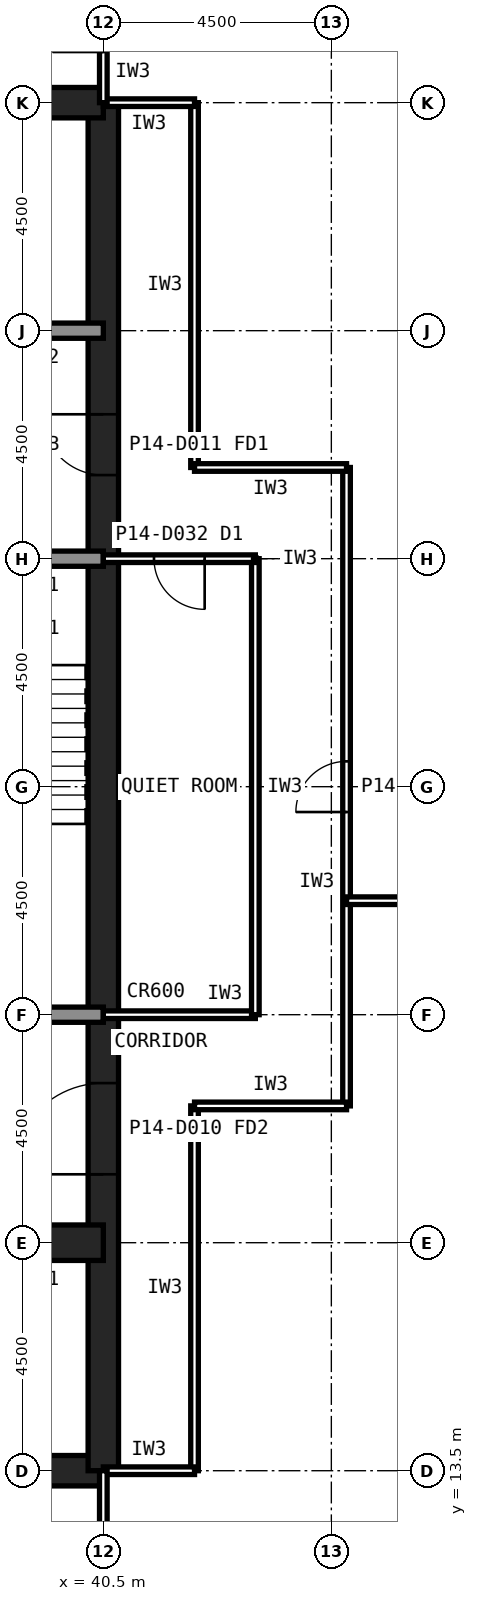
"""IFC4 building model, lengths in metres.
Left out: names, types, materials, properties, quantities, classifications, styles, units other than length and angle.
Written with IfcOpenShell. Run it as: python <this file> out.ifc"""

import sys

from ifc_helpers import new_model, si_unit, direction, frame, frame_2d, origin, place, context, subcontext, project, spatial, rectangle, extrude, element, fill, save


model = new_model("IFC4")
c1 = context("Model", 3, precision=1e-05, world=origin(), true_north=direction((0.0, 1.0)))
c2 = subcontext(c1, "Body", "Model", "MODEL_VIEW")
j1 = project(units=[si_unit("LENGTHUNIT", "METRE"), si_unit("PLANEANGLEUNIT", "RADIAN")], contexts=[c1])
p1 = place(None, origin())
s1 = spatial("IfcSite", under=j1, at=p1, CompositionType="ELEMENT")
p2 = place(p1, origin())
s2 = spatial("IfcBuilding", under=s1, at=p2, CompositionType="ELEMENT")
p3 = place(p2, frame((0.0, 0.0, 62.6)))
s3 = spatial("IfcBuildingStorey", under=s2, at=p3, CompositionType="ELEMENT", Elevation=62.6)
p4 = place(p3, frame((13.5, 13.5, 0.0), z_axis=(0.0, 0.0, 1.0), x_axis=(1.0, 0.0, 0.0)))
e1 = element("IfcWall", 1, at=p4, inside=s3, PredefinedType="SHEAR", context=c2, shape_type="SweptSolid", body=[
    extrude(rectangle(XDim=27.0, YDim=0.6, at=frame_2d((13.5, 0.0))), origin(), (0.0, 0.0, 1.0), 4.2),
])
p5 = place(p3, frame((40.5, 13.5, 0.0), z_axis=(0.0, 0.0, 1.0), x_axis=(0.0, 1.0, 0.0)))
e2 = element("IfcWall", 2, at=p5, inside=s3, PredefinedType="SHEAR", context=c2, shape_type="SweptSolid", body=[
    extrude(rectangle(XDim=27.0, YDim=0.6, at=frame_2d((13.5, 0.0))), origin(), (0.0, 0.0, 1.0), 4.2),
])
p6 = place(p5, frame((5.85, 0.0, 0.0)))
e3 = element("IfcOpeningElement", 3, at=p6, cuts=e2, PredefinedType="OPENING", context=c2, shape_type="SweptSolid", body=[
    extrude(rectangle(XDim=1.8, YDim=2.1, at=frame_2d((0.9, 1.05))), frame((0.0, 0.31, 0.0), z_axis=(0.0, -1.0, 0.0), x_axis=(1.0, 0.0, 0.0)), (0.0, 0.0, 1.0), 0.62),
])
p7 = place(p5, frame((19.65, 0.0, 0.0)))
e4 = element("IfcOpeningElement", 4, at=p7, cuts=e2, PredefinedType="OPENING", context=c2, shape_type="SweptSolid", body=[
    extrude(rectangle(XDim=1.2, YDim=2.1, at=frame_2d((0.6, 1.05))), frame((0.0, 0.31, 0.0), z_axis=(0.0, -1.0, 0.0), x_axis=(1.0, 0.0, 0.0)), (0.0, 0.0, 1.0), 0.62),
])
p8 = place(p3, frame((40.5, 40.5, 0.0), z_axis=(0.0, 0.0, 1.0), x_axis=(-1.0, 0.0, 0.0)))
e5 = element("IfcWall", 5, at=p8, inside=s3, PredefinedType="SHEAR", context=c2, shape_type="SweptSolid", body=[
    extrude(rectangle(XDim=27.0, YDim=0.6, at=frame_2d((13.5, 0.0))), origin(), (0.0, 0.0, 1.0), 4.2),
])
p9 = place(p3, frame((13.5, 18.0, 0.0), z_axis=(0.0, 0.0, 1.0), x_axis=(1.0, 0.0, 0.0)))
e6 = element("IfcWall", 6, at=p9, inside=s3, PredefinedType="SHEAR", context=c2, shape_type="SweptSolid", body=[
    extrude(rectangle(XDim=27.0, YDim=0.7, at=frame_2d((13.5, 0.0))), origin(), (0.0, 0.0, 1.0), 4.2),
])
p10 = place(p9, frame((24.3, 0.0, 0.0)))
e7 = element("IfcOpeningElement", 7, at=p10, cuts=e6, PredefinedType="OPENING", context=c2, shape_type="SweptSolid", body=[
    extrude(rectangle(XDim=0.9, YDim=2.1, at=frame_2d((0.45, 1.05))), frame((0.0, 0.36, 0.0), z_axis=(0.0, -1.0, 0.0), x_axis=(1.0, 0.0, 0.0)), (0.0, 0.0, 1.0), 0.72),
])
p11 = place(p9, frame((5.45, 0.0, 0.0)))
e8 = element("IfcOpeningElement", 8, at=p11, cuts=e6, PredefinedType="OPENING", context=c2, shape_type="SweptSolid", body=[
    extrude(rectangle(XDim=1.1, YDim=2.1, at=frame_2d((0.55, 1.05))), frame((0.0, 0.36, 0.0), z_axis=(0.0, -1.0, 0.0), x_axis=(1.0, 0.0, 0.0)), (0.0, 0.0, 1.0), 0.72),
])
p12 = place(p9, frame((8.45, 0.0, 0.0)))
e9 = element("IfcOpeningElement", 9, at=p12, cuts=e6, PredefinedType="OPENING", context=c2, shape_type="SweptSolid", body=[
    extrude(rectangle(XDim=1.1, YDim=2.1, at=frame_2d((0.55, 1.05))), frame((0.0, 0.36, 0.0), z_axis=(0.0, -1.0, 0.0), x_axis=(1.0, 0.0, 0.0)), (0.0, 0.0, 1.0), 0.72),
])
p13 = place(p9, frame((11.45, 0.0, 0.0)))
e10 = element("IfcOpeningElement", 10, at=p13, cuts=e6, PredefinedType="OPENING", context=c2, shape_type="SweptSolid", body=[
    extrude(rectangle(XDim=1.1, YDim=2.1, at=frame_2d((0.55, 1.05))), frame((0.0, 0.36, 0.0), z_axis=(0.0, -1.0, 0.0), x_axis=(1.0, 0.0, 0.0)), (0.0, 0.0, 1.0), 0.72),
])
p14 = place(p9, frame((14.45, 0.0, 0.0)))
e11 = element("IfcOpeningElement", 11, at=p14, cuts=e6, PredefinedType="OPENING", context=c2, shape_type="SweptSolid", body=[
    extrude(rectangle(XDim=1.1, YDim=2.1, at=frame_2d((0.55, 1.05))), frame((0.0, 0.36, 0.0), z_axis=(0.0, -1.0, 0.0), x_axis=(1.0, 0.0, 0.0)), (0.0, 0.0, 1.0), 0.72),
])
p15 = place(p9, frame((17.45, 0.0, 0.0)))
e12 = element("IfcOpeningElement", 12, at=p15, cuts=e6, PredefinedType="OPENING", context=c2, shape_type="SweptSolid", body=[
    extrude(rectangle(XDim=1.1, YDim=2.1, at=frame_2d((0.55, 1.05))), frame((0.0, 0.36, 0.0), z_axis=(0.0, -1.0, 0.0), x_axis=(1.0, 0.0, 0.0)), (0.0, 0.0, 1.0), 0.72),
])
p16 = place(p9, frame((20.45, 0.0, 0.0)))
e13 = element("IfcOpeningElement", 13, at=p16, cuts=e6, PredefinedType="OPENING", context=c2, shape_type="SweptSolid", body=[
    extrude(rectangle(XDim=1.1, YDim=2.1, at=frame_2d((0.55, 1.05))), frame((0.0, 0.36, 0.0), z_axis=(0.0, -1.0, 0.0), x_axis=(1.0, 0.0, 0.0)), (0.0, 0.0, 1.0), 0.72),
])
p17 = place(p9, frame((1.6, 0.0, 0.0)))
e14 = element("IfcOpeningElement", 14, at=p17, cuts=e6, PredefinedType="OPENING", context=c2, shape_type="SweptSolid", body=[
    extrude(rectangle(XDim=1.3, YDim=2.2, at=frame_2d((0.65, 1.1))), frame((0.0, 0.36, 0.0), z_axis=(0.0, -1.0, 0.0), x_axis=(1.0, 0.0, 0.0)), (0.0, 0.0, 1.0), 0.72),
])
p18 = place(p3, frame((13.5, 36.0, 0.0), z_axis=(0.0, 0.0, 1.0), x_axis=(1.0, 0.0, 0.0)))
e15 = element("IfcWall", 15, at=p18, inside=s3, PredefinedType="SOLIDWALL", context=c2, shape_type="SweptSolid", body=[
    extrude(rectangle(XDim=27.0, YDim=0.3, at=frame_2d((13.5, 0.0))), origin(), (0.0, 0.0, 1.0), 4.04),
])
p19 = place(p18, frame((1.8, 0.0, 0.0)))
e16 = element("IfcOpeningElement", 16, at=p19, cuts=e15, PredefinedType="OPENING", context=c2, shape_type="SweptSolid", body=[
    extrude(rectangle(XDim=0.9, YDim=2.1, at=frame_2d((0.45, 1.05))), frame((0.0, 0.16, 0.0), z_axis=(0.0, -1.0, 0.0), x_axis=(1.0, 0.0, 0.0)), (0.0, 0.0, 1.0), 0.32),
])
p20 = place(p18, frame((24.1, 0.0, 0.0)))
e17 = element("IfcOpeningElement", 17, at=p20, cuts=e15, PredefinedType="OPENING", context=c2, shape_type="SweptSolid", body=[
    extrude(rectangle(XDim=1.3, YDim=2.2, at=frame_2d((0.65, 1.1))), frame((0.0, 0.16, 0.0), z_axis=(0.0, -1.0, 0.0), x_axis=(1.0, 0.0, 0.0)), (0.0, 0.0, 1.0), 0.32),
])
p21 = place(p3, frame((13.5, 22.5, 0.0), z_axis=(0.0, 0.0, 1.0), x_axis=(1.0, 0.0, 0.0)))
e18 = element("IfcWall", 18, at=p21, inside=s3, PredefinedType="SOLIDWALL", context=c2, shape_type="SweptSolid", body=[
    extrude(rectangle(XDim=27.0, YDim=0.3, at=frame_2d((13.5, 0.0))), origin(), (0.0, 0.0, 1.0), 4.04),
])
p22 = place(p21, frame((1.65, 0.0, 0.0)))
e19 = element("IfcOpeningElement", 19, at=p22, cuts=e18, PredefinedType="OPENING", context=c2, shape_type="SweptSolid", body=[
    extrude(rectangle(XDim=1.2, YDim=2.1, at=frame_2d((0.6, 1.05))), frame((0.0, 0.16, 0.0), z_axis=(0.0, -1.0, 0.0), x_axis=(1.0, 0.0, 0.0)), (0.0, 0.0, 1.0), 0.32),
])
p23 = place(p21, frame((6.025, 0.0, 0.0)))
e20 = element("IfcOpeningElement", 20, at=p23, cuts=e18, PredefinedType="OPENING", context=c2, shape_type="SweptSolid", body=[
    extrude(rectangle(XDim=1.0, YDim=2.1, at=frame_2d((0.5, 1.05))), frame((0.0, 0.16, 0.0), z_axis=(0.0, -1.0, 0.0), x_axis=(1.0, 0.0, 0.0)), (0.0, 0.0, 1.0), 0.32),
])
p24 = place(p21, frame((10.525, 0.0, 0.0)))
e21 = element("IfcOpeningElement", 21, at=p24, cuts=e18, PredefinedType="OPENING", context=c2, shape_type="SweptSolid", body=[
    extrude(rectangle(XDim=1.0, YDim=2.1, at=frame_2d((0.5, 1.05))), frame((0.0, 0.16, 0.0), z_axis=(0.0, -1.0, 0.0), x_axis=(1.0, 0.0, 0.0)), (0.0, 0.0, 1.0), 0.32),
])
p25 = place(p21, frame((19.75, 0.0, 0.0)))
e22 = element("IfcOpeningElement", 22, at=p25, cuts=e18, PredefinedType="OPENING", context=c2, shape_type="SweptSolid", body=[
    extrude(rectangle(XDim=1.0, YDim=2.1, at=frame_2d((0.5, 1.05))), frame((0.0, 0.16, 0.0), z_axis=(0.0, -1.0, 0.0), x_axis=(1.0, 0.0, 0.0)), (0.0, 0.0, 1.0), 0.32),
])
p26 = place(p21, frame((15.05, 0.0, 0.0)))
e23 = element("IfcOpeningElement", 23, at=p26, cuts=e18, PredefinedType="OPENING", context=c2, shape_type="SweptSolid", body=[
    extrude(rectangle(XDim=1.4, YDim=2.4, at=frame_2d((0.7, 1.2))), frame((0.0, 0.16, 0.0), z_axis=(0.0, -1.0, 0.0), x_axis=(1.0, 0.0, 0.0)), (0.0, 0.0, 1.0), 0.32),
])
p27 = place(p3, frame((13.5, 31.5, 0.0), z_axis=(0.0, 0.0, 1.0), x_axis=(1.0, 0.0, 0.0)))
e24 = element("IfcWall", 24, at=p27, inside=s3, PredefinedType="SOLIDWALL", context=c2, shape_type="SweptSolid", body=[
    extrude(rectangle(XDim=27.0, YDim=0.3, at=frame_2d((13.5, 0.0))), origin(), (0.0, 0.0, 1.0), 4.04),
])
p28 = place(p27, frame((24.15, 0.0, 0.0)))
e25 = element("IfcOpeningElement", 25, at=p28, cuts=e24, PredefinedType="OPENING", context=c2, shape_type="SweptSolid", body=[
    extrude(rectangle(XDim=1.2, YDim=2.1, at=frame_2d((0.6, 1.05))), frame((0.0, 0.16, 0.0), z_axis=(0.0, -1.0, 0.0), x_axis=(1.0, 0.0, 0.0)), (0.0, 0.0, 1.0), 0.32),
])
p29 = place(p27, frame((15.3, 0.0, 0.0)))
e26 = element("IfcOpeningElement", 26, at=p29, cuts=e24, PredefinedType="OPENING", context=c2, shape_type="SweptSolid", body=[
    extrude(rectangle(XDim=0.9, YDim=2.1, at=frame_2d((0.45, 1.05))), frame((0.0, 0.16, 0.0), z_axis=(0.0, -1.0, 0.0), x_axis=(1.0, 0.0, 0.0)), (0.0, 0.0, 1.0), 0.32),
])
p30 = place(p27, frame((19.8, 0.0, 0.0)))
e27 = element("IfcOpeningElement", 27, at=p30, cuts=e24, PredefinedType="OPENING", context=c2, shape_type="SweptSolid", body=[
    extrude(rectangle(XDim=0.9, YDim=2.1, at=frame_2d((0.45, 1.05))), frame((0.0, 0.16, 0.0), z_axis=(0.0, -1.0, 0.0), x_axis=(1.0, 0.0, 0.0)), (0.0, 0.0, 1.0), 0.32),
])
p31 = place(p3, frame((45.3, 20.7, 0.0), z_axis=(0.0, 0.0, 1.0), x_axis=(0.0, 1.0, 0.0)))
e28 = element("IfcWall", 28, at=p31, inside=s3, PredefinedType="PARTITIONING", context=c2, shape_type="SweptSolid", body=[
    extrude(rectangle(XDim=12.6, YDim=0.15, at=frame_2d((6.3, 0.0))), origin(), (0.0, 0.0, 1.0), 4.04),
])
p32 = place(p31, frame((5.8, 0.0, 0.0)))
e29 = element("IfcOpeningElement", 29, at=p32, cuts=e28, PredefinedType="OPENING", context=c2, shape_type="SweptSolid", body=[
    extrude(rectangle(XDim=1.0, YDim=2.1, at=frame_2d((0.5, 1.05))), frame((0.0, 0.085, 0.0), z_axis=(0.0, -1.0, 0.0), x_axis=(1.0, 0.0, 0.0)), (0.0, 0.0, 1.0), 0.17),
])
for number, where, z_axis, x_axis in (
    (30, (42.3, 13.5, 0.0), (0.0, 0.0, 1.0), (0.0, 1.0, 0.0)),
    (31, (42.3, 33.3, 0.0), (0.0, 0.0, 1.0), (0.0, 1.0, 0.0)),
):
    element("IfcWall", number, at=place(p3, frame(where, z_axis=z_axis, x_axis=x_axis)), inside=s3, PredefinedType="PARTITIONING", context=c2, shape_type="SweptSolid", body=[
        extrude(rectangle(XDim=7.2, YDim=0.15, at=frame_2d((3.6, 0.0))), origin(), (0.0, 0.0, 1.0), 4.04),
    ])
for number, where, z_axis, x_axis in (
    (32, (42.3, 20.7, 0.0), (0.0, 0.0, 1.0), (1.0, 0.0, 0.0)),
    (33, (45.3, 33.3, 0.0), (0.0, 0.0, 1.0), (-1.0, 0.0, 0.0)),
):
    element("IfcWall", number, at=place(p3, frame(where, z_axis=z_axis, x_axis=x_axis)), inside=s3, PredefinedType="PARTITIONING", context=c2, shape_type="SweptSolid", body=[
        extrude(rectangle(XDim=3.0, YDim=0.15, at=frame_2d((1.5, 0.0))), origin(), (0.0, 0.0, 1.0), 4.04),
    ])
for number, where, z_axis, x_axis in (
    (34, (40.5, 13.5, 0.0), (0.0, 0.0, 1.0), (1.0, 0.0, 0.0)),
    (35, (42.3, 40.5, 0.0), (0.0, 0.0, 1.0), (-1.0, 0.0, 0.0)),
):
    element("IfcWall", number, at=place(p3, frame(where, z_axis=z_axis, x_axis=x_axis)), inside=s3, PredefinedType="PARTITIONING", context=c2, shape_type="SweptSolid", body=[
        extrude(rectangle(XDim=1.8, YDim=0.15, at=frame_2d((0.9, 0.0))), origin(), (0.0, 0.0, 1.0), 3.189),
    ])
p33 = place(p3, frame((40.5, 40.5, 0.0), z_axis=(0.0, 0.0, 1.0), x_axis=(0.0, 1.0, 0.0)))
e36 = element("IfcWall", 36, at=p33, inside=s3, PredefinedType="PARTITIONING", context=c2, shape_type="SweptSolid", body=[
    extrude(rectangle(XDim=3.0, YDim=0.15, at=frame_2d((1.5, 0.0))), origin(), (0.0, 0.0, 1.0), 3.189),
])
p34 = place(p33, frame((1.0, 0.0, 0.0)))
e37 = element("IfcOpeningElement", 37, at=p34, cuts=e36, PredefinedType="OPENING", context=c2, shape_type="SweptSolid", body=[
    extrude(rectangle(XDim=1.0, YDim=2.1, at=frame_2d((0.5, 1.05))), frame((0.0, 0.085, 0.0), z_axis=(0.0, -1.0, 0.0), x_axis=(1.0, 0.0, 0.0)), (0.0, 0.0, 1.0), 0.17),
])
p35 = place(p3, frame((40.5, 9.0, 0.0), z_axis=(0.0, 0.0, 1.0), x_axis=(0.0, 1.0, 0.0)))
e38 = element("IfcWall", 38, at=p35, inside=s3, PredefinedType="PARTITIONING", context=c2, shape_type="SweptSolid", body=[
    extrude(rectangle(XDim=4.5, YDim=0.15, at=frame_2d((2.25, 0.0))), origin(), (0.0, 0.0, 1.0), 3.189),
])
p36 = place(p3, frame((40.5, 22.5, 0.0), z_axis=(0.0, 0.0, 1.0), x_axis=(1.0, 0.0, 0.0)))
e39 = element("IfcWall", 39, at=p36, inside=s3, PredefinedType="PARTITIONING", context=c2, shape_type="SweptSolid", body=[
    extrude(rectangle(XDim=3.0, YDim=0.15, at=frame_2d((1.5, 0.0))), origin(), (0.0, 0.0, 1.0), 3.189),
])
p37 = place(p3, frame((43.5, 22.5, 0.0), z_axis=(0.0, 0.0, 1.0), x_axis=(0.0, 1.0, 0.0)))
e40 = element("IfcWall", 40, at=p37, inside=s3, PredefinedType="PARTITIONING", context=c2, shape_type="SweptSolid", body=[
    extrude(rectangle(XDim=9.0, YDim=0.15, at=frame_2d((4.5, 0.0))), origin(), (0.0, 0.0, 1.0), 4.04),
])
p38 = place(p3, frame((43.5, 31.5, 0.0), z_axis=(0.0, 0.0, 1.0), x_axis=(-1.0, 0.0, 0.0)))
e41 = element("IfcWall", 41, at=p38, inside=s3, PredefinedType="PARTITIONING", context=c2, shape_type="SweptSolid", body=[
    extrude(rectangle(XDim=3.0, YDim=0.15, at=frame_2d((1.5, 0.0))), origin(), (0.0, 0.0, 1.0), 3.189),
])
p39 = place(p38, frame((1.0, 0.0, 0.0)))
e42 = element("IfcOpeningElement", 42, at=p39, cuts=e41, PredefinedType="OPENING", context=c2, shape_type="SweptSolid", body=[
    extrude(rectangle(XDim=1.0, YDim=2.1, at=frame_2d((0.5, 1.05))), frame((0.0, 0.085, 0.0), z_axis=(0.0, -1.0, 0.0), x_axis=(1.0, 0.0, 0.0)), (0.0, 0.0, 1.0), 0.17),
])
p40 = place(p3, frame((54.52, 24.75, 0.0), z_axis=(0.0, 0.0, 1.0), x_axis=(-1.0, 0.0, 0.0)))
e43 = element("IfcWall", 43, at=p40, inside=s3, PredefinedType="PARTITIONING", context=c2, shape_type="SweptSolid", body=[
    extrude(rectangle(XDim=9.22, YDim=0.15, at=frame_2d((4.61, 0.0))), origin(), (0.0, 0.0, 1.0), 4.04),
])
p41 = place(p40, frame((4.37, 0.0, 0.0)))
e44 = element("IfcOpeningElement", 44, at=p41, cuts=e43, PredefinedType="OPENING", context=c2, shape_type="SweptSolid", body=[
    extrude(rectangle(XDim=1.0, YDim=2.1, at=frame_2d((0.5, 1.05))), frame((0.0, 0.085, 0.0), z_axis=(0.0, -1.0, 0.0), x_axis=(1.0, 0.0, 0.0)), (0.0, 0.0, 1.0), 0.17),
])
p42 = place(p6, origin())
e45 = element("IfcDoor", 45, at=p42, inside=s3, OperationType="SINGLE_SWING_LEFT", PredefinedType="DOOR", context=c2, shape_type="SweptSolid", body=[
    extrude(rectangle(XDim=1.8, YDim=2.1, at=frame_2d((0.9, 1.05))), frame((0.0, 0.025, 0.0), z_axis=(0.0, -1.0, 0.0), x_axis=(1.0, 0.0, 0.0)), (0.0, 0.0, 1.0), 0.05),
])
fill(e3, e45)
p43 = place(p7, origin())
e46 = element("IfcDoor", 46, at=p43, inside=s3, OperationType="SINGLE_SWING_RIGHT", PredefinedType="DOOR", context=c2, shape_type="SweptSolid", body=[
    extrude(rectangle(XDim=1.2, YDim=2.1, at=frame_2d((0.6, 1.05))), frame((0.0, 0.025, 0.0), z_axis=(0.0, -1.0, 0.0), x_axis=(1.0, 0.0, 0.0)), (0.0, 0.0, 1.0), 0.05),
])
fill(e4, e46)
p44 = place(p32, origin())
e47 = element("IfcDoor", 47, at=p44, inside=s3, OperationType="SINGLE_SWING_LEFT", PredefinedType="DOOR", context=c2, shape_type="SweptSolid", body=[
    extrude(rectangle(XDim=1.0, YDim=2.1, at=frame_2d((0.5, 1.05))), frame((0.0, 0.025, 0.0), z_axis=(0.0, -1.0, 0.0), x_axis=(1.0, 0.0, 0.0)), (0.0, 0.0, 1.0), 0.05),
])
fill(e29, e47)
p45 = place(p39, origin())
e48 = element("IfcDoor", 48, at=p45, inside=s3, OperationType="SINGLE_SWING_LEFT", PredefinedType="DOOR", context=c2, shape_type="SweptSolid", body=[
    extrude(rectangle(XDim=1.0, YDim=2.1, at=frame_2d((0.5, 1.05))), frame((0.0, 0.025, 0.0), z_axis=(0.0, -1.0, 0.0), x_axis=(1.0, 0.0, 0.0)), (0.0, 0.0, 1.0), 0.05),
])
fill(e42, e48)
save(model, sys.argv[1])
